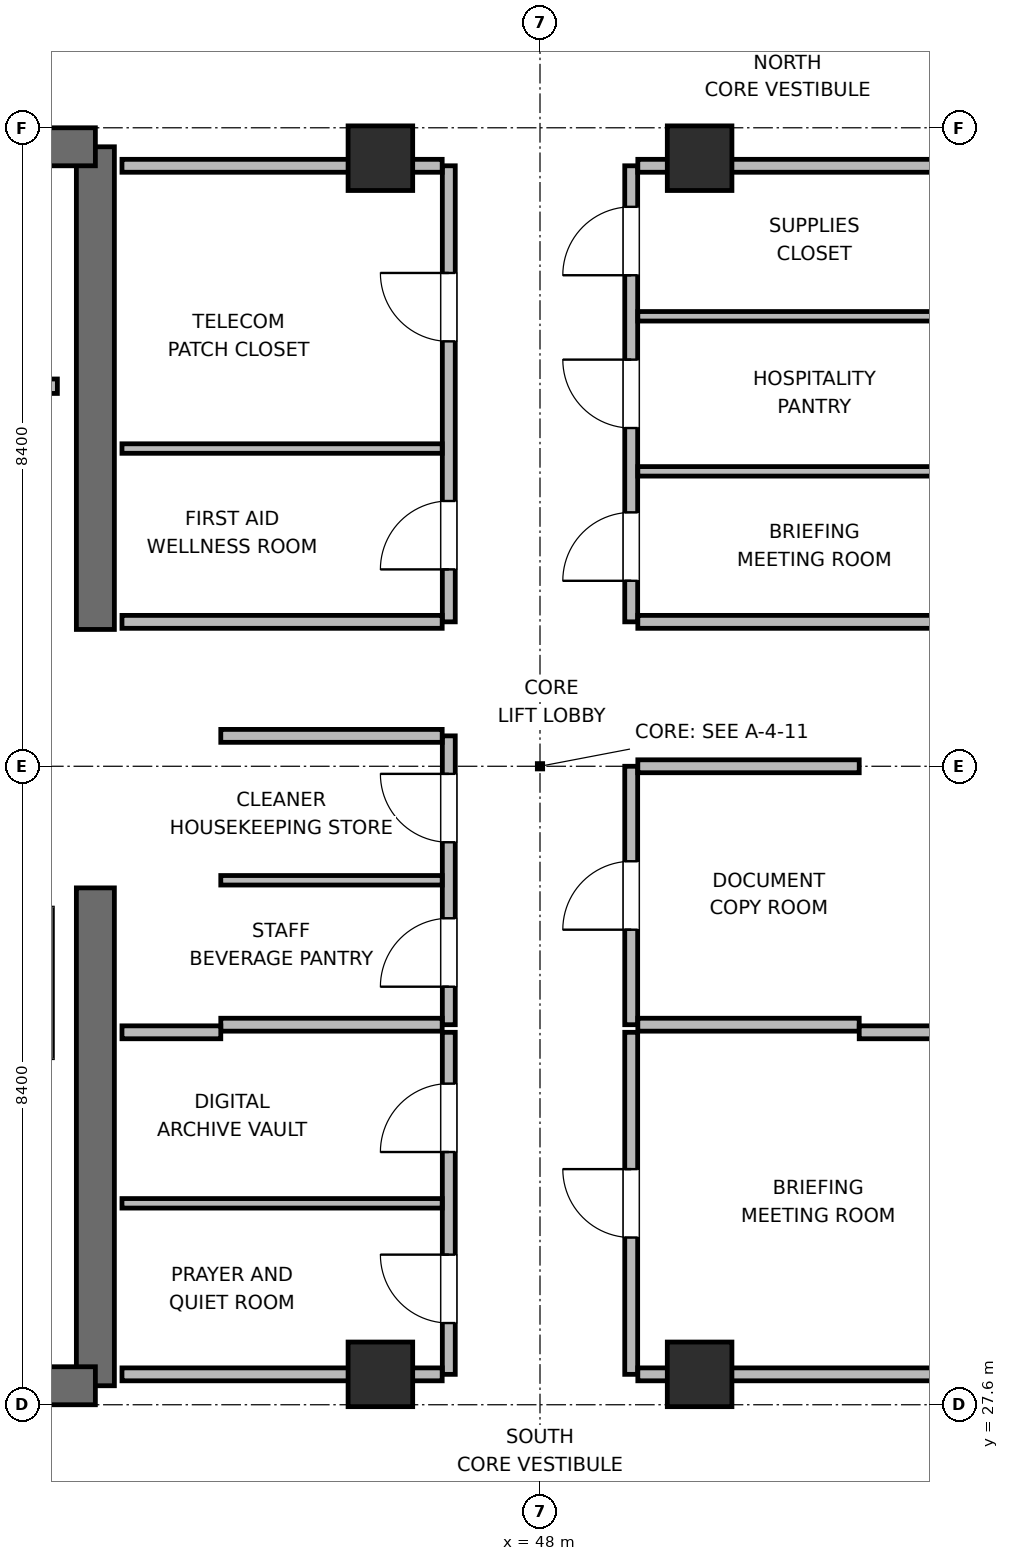
"""IFC4 building model, lengths in metres.
Left out: names, types, materials, properties, quantities, classifications, styles, units other than length and angle.
Written with IfcOpenShell. Run it as: python <this file> out.ifc"""

import sys

from ifc_helpers import new_model, si_unit, direction, frame, frame_2d, origin, origin_2d, place, context, subcontext, project, spatial, rectangle, extrude, element, fill, save


model = new_model("IFC4")
c1 = context("Model", 3, precision=1e-05, world=origin(), true_north=direction((0.0, 1.0)))
c2 = subcontext(c1, "Body", "Model", "MODEL_VIEW")
j1 = project(units=[si_unit("LENGTHUNIT", "METRE"), si_unit("PLANEANGLEUNIT", "RADIAN")], contexts=[c1])
p1 = place(None, origin())
s1 = spatial("IfcSite", under=j1, at=p1, CompositionType="ELEMENT")
p2 = place(p1, origin())
s2 = spatial("IfcBuilding", under=s1, at=p2, CompositionType="ELEMENT")
p3 = place(p2, frame((0.0, 0.0, 342.0)))
s3 = spatial("IfcBuildingStorey", under=s2, at=p3, CompositionType="ELEMENT", Elevation=342.0)
p4 = place(p3, frame((42.15, 27.85, 0.0), z_axis=(0.0, 0.0, 1.0), x_axis=(0.0, 1.0, 0.0)))
e1 = element("IfcWall", 1, at=p4, inside=s3, PredefinedType="SHEAR", context=c2, shape_type="SweptSolid", body=[
    extrude(rectangle(XDim=6.55, YDim=0.5, at=frame_2d((3.275, 0.0))), origin(), (0.0, 0.0, 1.0), 4.5),
])
p5 = place(p3, frame((42.15, 37.8, 0.0), z_axis=(0.0, 0.0, 1.0), x_axis=(0.0, 1.0, 0.0)))
e2 = element("IfcWall", 2, at=p5, inside=s3, PredefinedType="SHEAR", context=c2, shape_type="SweptSolid", body=[
    extrude(rectangle(XDim=6.35, YDim=0.5, at=frame_2d((3.175, 0.0))), origin(), (0.0, 0.0, 1.0), 4.5),
])
p6 = place(p3, frame((32.65, 27.85, 0.0), z_axis=(0.0, 0.0, 1.0), x_axis=(1.0, 0.0, 0.0)))
e3 = element("IfcWall", 3, at=p6, inside=s3, PredefinedType="SHEAR", context=c2, shape_type="SweptSolid", body=[
    extrude(rectangle(XDim=9.5, YDim=0.5, at=frame_2d((4.75, 0.0))), origin(), (0.0, 0.0, 1.0), 4.5),
])
p7 = place(p6, frame((5.075, 0.0, 0.0)))
e4 = element("IfcOpeningElement", 4, at=p7, cuts=e3, PredefinedType="OPENING", context=c2, shape_type="SweptSolid", body=[
    extrude(rectangle(XDim=1.05, YDim=2.04, at=frame_2d((0.525, 1.02))), frame((0.0, 0.26, 0.0), z_axis=(0.0, -1.0, 0.0), x_axis=(1.0, 0.0, 0.0)), (0.0, 0.0, 1.0), 0.52),
])
p8 = place(p3, frame((32.65, 44.15, 0.0), z_axis=(0.0, 0.0, 1.0), x_axis=(1.0, 0.0, 0.0)))
e5 = element("IfcWall", 5, at=p8, inside=s3, PredefinedType="SHEAR", context=c2, shape_type="SweptSolid", body=[
    extrude(rectangle(XDim=9.5, YDim=0.5, at=frame_2d((4.75, 0.0))), origin(), (0.0, 0.0, 1.0), 4.5),
])
p9 = place(p8, frame((1.075, 0.0, 0.0)))
e6 = element("IfcOpeningElement", 6, at=p9, cuts=e5, PredefinedType="OPENING", context=c2, shape_type="SweptSolid", body=[
    extrude(rectangle(XDim=0.95, YDim=2.04, at=frame_2d((0.475, 1.02))), frame((0.0, 0.26, 0.0), z_axis=(0.0, -1.0, 0.0), x_axis=(1.0, 0.0, 0.0)), (0.0, 0.0, 1.0), 0.52),
])
p10 = place(p8, frame((4.325, 0.0, 0.0)))
e7 = element("IfcOpeningElement", 7, at=p10, cuts=e5, PredefinedType="OPENING", context=c2, shape_type="SweptSolid", body=[
    extrude(rectangle(XDim=0.9, YDim=2.02, at=frame_2d((0.45, 1.01))), frame((0.0, 0.26, 0.0), z_axis=(0.0, -1.0, 0.0), x_axis=(1.0, 0.0, 0.0)), (0.0, 0.0, 1.0), 0.52),
])
p11 = place(p8, frame((7.225, 0.0, 0.0)))
e8 = element("IfcOpeningElement", 8, at=p11, cuts=e5, PredefinedType="OPENING", context=c2, shape_type="SweptSolid", body=[
    extrude(rectangle(XDim=0.9, YDim=2.02, at=frame_2d((0.45, 1.01))), frame((0.0, 0.26, 0.0), z_axis=(0.0, -1.0, 0.0), x_axis=(1.0, 0.0, 0.0)), (0.0, 0.0, 1.0), 0.52),
])
for number, where, z_axis, x_axis in (
    (9, (45.9, 28.0, 0.0), (0.0, 0.0, 1.0), (1.0, 0.0, 0.0)),
    (10, (50.1, 28.0, 0.0), (0.0, 0.0, 1.0), (1.0, 0.0, 0.0)),
    (11, (45.9, 44.0, 0.0), (0.0, 0.0, 1.0), (1.0, 0.0, 0.0)),
    (12, (50.1, 44.0, 0.0), (0.0, 0.0, 1.0), (1.0, 0.0, 0.0)),
):
    element("IfcColumn", number, at=place(p3, frame(where, z_axis=z_axis, x_axis=x_axis)), inside=s3, PredefinedType="COLUMN", context=c2, shape_type="SweptSolid", body=[
        extrude(rectangle(XDim=0.85, YDim=0.85, at=origin_2d()), origin(), (0.0, 0.0, 1.0), 4.5),
    ])
p12 = place(p3, frame((33.15, 41.0, 0.0), z_axis=(0.0, 0.0, 1.0), x_axis=(1.0, 0.0, 0.0)))
e13 = element("IfcWall", 13, at=p12, inside=s3, PredefinedType="PLUMBINGWALL", context=c2, shape_type="SweptSolid", body=[
    extrude(rectangle(XDim=8.5, YDim=0.19, at=frame_2d((4.25, 0.0))), origin(), (0.0, 0.0, 1.0), 4.28),
])
p13 = place(p3, frame((46.8, 32.6, 0.0), z_axis=(0.0, 0.0, 1.0), x_axis=(0.0, 1.0, 0.0)))
e14 = element("IfcWall", 14, at=p13, inside=s3, PredefinedType="PARTITIONING", context=c2, shape_type="SweptSolid", body=[
    extrude(rectangle(XDim=3.8, YDim=0.17, at=frame_2d((1.9, 0.0))), origin(), (0.0, 0.0, 1.0), 4.28),
])
p14 = place(p13, frame((0.5, 0.0, 0.0)))
e15 = element("IfcOpeningElement", 15, at=p14, cuts=e14, PredefinedType="OPENING", context=c2, shape_type="SweptSolid", body=[
    extrude(rectangle(XDim=0.9, YDim=2.02, at=frame_2d((0.45, 1.01))), frame((0.0, 0.095, 0.0), z_axis=(0.0, -1.0, 0.0), x_axis=(1.0, 0.0, 0.0)), (0.0, 0.0, 1.0), 0.19),
])
p15 = place(p13, frame((2.4, 0.0, 0.0)))
e16 = element("IfcOpeningElement", 16, at=p15, cuts=e14, PredefinedType="OPENING", context=c2, shape_type="SweptSolid", body=[
    extrude(rectangle(XDim=0.9, YDim=2.02, at=frame_2d((0.45, 1.01))), frame((0.0, 0.095, 0.0), z_axis=(0.0, -1.0, 0.0), x_axis=(1.0, 0.0, 0.0)), (0.0, 0.0, 1.0), 0.19),
])
for number, where, z_axis, x_axis in (
    (17, (43.8, 32.6, 0.0), (0.0, 0.0, 1.0), (1.0, 0.0, 0.0)),
    (18, (43.8, 36.4, 0.0), (0.0, 0.0, 1.0), (1.0, 0.0, 0.0)),
):
    element("IfcWall", number, at=place(p3, frame(where, z_axis=z_axis, x_axis=x_axis)), inside=s3, PredefinedType="PARTITIONING", context=c2, shape_type="SweptSolid", body=[
        extrude(rectangle(XDim=2.913, YDim=0.17, at=frame_2d((1.457, 0.0))), origin(), (0.0, 0.0, 1.0), 4.28),
    ])
p16 = place(p3, frame((43.8, 34.5, 0.0), z_axis=(0.0, 0.0, 1.0), x_axis=(1.0, 0.0, 0.0)))
e19 = element("IfcWall", 19, at=p16, inside=s3, PredefinedType="PARTITIONING", context=c2, shape_type="SweptSolid", body=[
    extrude(rectangle(XDim=2.913, YDim=0.125, at=frame_2d((1.457, 0.0))), origin(), (0.0, 0.0, 1.0), 4.28),
])
p17 = place(p3, frame((49.2, 32.6, 0.0), z_axis=(0.0, 0.0, 1.0), x_axis=(0.0, 1.0, 0.0)))
e20 = element("IfcWall", 20, at=p17, inside=s3, PredefinedType="PARTITIONING", context=c2, shape_type="SweptSolid", body=[
    extrude(rectangle(XDim=3.4, YDim=0.17, at=frame_2d((1.7, 0.0))), origin(), (0.0, 0.0, 1.0), 4.28),
])
p18 = place(p17, frame((1.25, 0.0, 0.0)))
e21 = element("IfcOpeningElement", 21, at=p18, cuts=e20, PredefinedType="OPENING", context=c2, shape_type="SweptSolid", body=[
    extrude(rectangle(XDim=0.9, YDim=2.02, at=frame_2d((0.45, 1.01))), frame((0.0, 0.095, 0.0), z_axis=(0.0, -1.0, 0.0), x_axis=(1.0, 0.0, 0.0)), (0.0, 0.0, 1.0), 0.19),
])
for number, where, z_axis, x_axis in (
    (22, (49.287, 32.6, 0.0), (0.0, 0.0, 1.0), (1.0, 0.0, 0.0)),
    (23, (49.287, 36.0, 0.0), (0.0, 0.0, 1.0), (1.0, 0.0, 0.0)),
):
    element("IfcWall", number, at=place(p3, frame(where, z_axis=z_axis, x_axis=x_axis)), inside=s3, PredefinedType="PARTITIONING", context=c2, shape_type="SweptSolid", body=[
        extrude(rectangle(XDim=2.913, YDim=0.17, at=frame_2d((1.457, 0.0))), origin(), (0.0, 0.0, 1.0), 4.28),
    ])
p19 = place(p3, frame((46.8, 28.0, 0.0), z_axis=(0.0, 0.0, 1.0), x_axis=(0.0, 1.0, 0.0)))
e24 = element("IfcWall", 24, at=p19, inside=s3, PredefinedType="PARTITIONING", context=c2, shape_type="SweptSolid", body=[
    extrude(rectangle(XDim=4.5, YDim=0.17, at=frame_2d((2.25, 0.0))), origin(), (0.0, 0.0, 1.0), 4.28),
])
p20 = place(p19, frame((0.675, 0.0, 0.0)))
e25 = element("IfcOpeningElement", 25, at=p20, cuts=e24, PredefinedType="OPENING", context=c2, shape_type="SweptSolid", body=[
    extrude(rectangle(XDim=0.9, YDim=2.02, at=frame_2d((0.45, 1.01))), frame((0.0, 0.095, 0.0), z_axis=(0.0, -1.0, 0.0), x_axis=(1.0, 0.0, 0.0)), (0.0, 0.0, 1.0), 0.19),
])
p21 = place(p19, frame((2.925, 0.0, 0.0)))
e26 = element("IfcOpeningElement", 26, at=p21, cuts=e24, PredefinedType="OPENING", context=c2, shape_type="SweptSolid", body=[
    extrude(rectangle(XDim=0.9, YDim=2.02, at=frame_2d((0.45, 1.01))), frame((0.0, 0.095, 0.0), z_axis=(0.0, -1.0, 0.0), x_axis=(1.0, 0.0, 0.0)), (0.0, 0.0, 1.0), 0.19),
])
p22 = place(p3, frame((42.5, 28.0, 0.0), z_axis=(0.0, 0.0, 1.0), x_axis=(1.0, 0.0, 0.0)))
e27 = element("IfcWall", 27, at=p22, inside=s3, PredefinedType="PARTITIONING", context=c2, shape_type="SweptSolid", body=[
    extrude(rectangle(XDim=4.213, YDim=0.17, at=frame_2d((2.106, 0.0))), origin(), (0.0, 0.0, 1.0), 3.365),
])
p23 = place(p3, frame((42.5, 32.5, 0.0), z_axis=(0.0, 0.0, 1.0), x_axis=(1.0, 0.0, 0.0)))
e28 = element("IfcWall", 28, at=p23, inside=s3, PredefinedType="PARTITIONING", context=c2, shape_type="SweptSolid", body=[
    extrude(rectangle(XDim=1.3, YDim=0.17, at=frame_2d((0.65, 0.0))), origin(), (0.0, 0.0, 1.0), 4.28),
])
p24 = place(p3, frame((42.5, 30.25, 0.0), z_axis=(0.0, 0.0, 1.0), x_axis=(1.0, 0.0, 0.0)))
e29 = element("IfcWall", 29, at=p24, inside=s3, PredefinedType="PARTITIONING", context=c2, shape_type="SweptSolid", body=[
    extrude(rectangle(XDim=4.213, YDim=0.125, at=frame_2d((2.106, 0.0))), origin(), (0.0, 0.0, 1.0), 4.28),
])
p25 = place(p3, frame((49.2, 28.0, 0.0), z_axis=(0.0, 0.0, 1.0), x_axis=(0.0, 1.0, 0.0)))
e30 = element("IfcWall", 30, at=p25, inside=s3, PredefinedType="PARTITIONING", context=c2, shape_type="SweptSolid", body=[
    extrude(rectangle(XDim=4.5, YDim=0.17, at=frame_2d((2.25, 0.0))), origin(), (0.0, 0.0, 1.0), 4.28),
])
p26 = place(p25, frame((1.8, 0.0, 0.0)))
e31 = element("IfcOpeningElement", 31, at=p26, cuts=e30, PredefinedType="OPENING", context=c2, shape_type="SweptSolid", body=[
    extrude(rectangle(XDim=0.9, YDim=2.02, at=frame_2d((0.45, 1.01))), frame((0.0, 0.095, 0.0), z_axis=(0.0, -1.0, 0.0), x_axis=(1.0, 0.0, 0.0)), (0.0, 0.0, 1.0), 0.19),
])
p27 = place(p3, frame((49.287, 28.0, 0.0), z_axis=(0.0, 0.0, 1.0), x_axis=(1.0, 0.0, 0.0)))
e32 = element("IfcWall", 32, at=p27, inside=s3, PredefinedType="PARTITIONING", context=c2, shape_type="SweptSolid", body=[
    extrude(rectangle(XDim=4.213, YDim=0.17, at=frame_2d((2.106, 0.0))), origin(), (0.0, 0.0, 1.0), 3.365),
])
p28 = place(p3, frame((52.2, 32.5, 0.0), z_axis=(0.0, 0.0, 1.0), x_axis=(1.0, 0.0, 0.0)))
e33 = element("IfcWall", 33, at=p28, inside=s3, PredefinedType="PARTITIONING", context=c2, shape_type="SweptSolid", body=[
    extrude(rectangle(XDim=1.3, YDim=0.17, at=frame_2d((0.65, 0.0))), origin(), (0.0, 0.0, 1.0), 4.28),
])
p29 = place(p3, frame((46.8, 37.9, 0.0), z_axis=(0.0, 0.0, 1.0), x_axis=(0.0, 1.0, 0.0)))
e34 = element("IfcWall", 34, at=p29, inside=s3, PredefinedType="PARTITIONING", context=c2, shape_type="SweptSolid", body=[
    extrude(rectangle(XDim=6.0, YDim=0.17, at=frame_2d((3.0, 0.0))), origin(), (0.0, 0.0, 1.0), 4.28),
])
p30 = place(p29, frame((0.69, 0.0, 0.0)))
e35 = element("IfcOpeningElement", 35, at=p30, cuts=e34, PredefinedType="OPENING", context=c2, shape_type="SweptSolid", body=[
    extrude(rectangle(XDim=0.9, YDim=2.02, at=frame_2d((0.45, 1.01))), frame((0.0, 0.095, 0.0), z_axis=(0.0, -1.0, 0.0), x_axis=(1.0, 0.0, 0.0)), (0.0, 0.0, 1.0), 0.19),
])
p31 = place(p29, frame((3.69, 0.0, 0.0)))
e36 = element("IfcOpeningElement", 36, at=p31, cuts=e34, PredefinedType="OPENING", context=c2, shape_type="SweptSolid", body=[
    extrude(rectangle(XDim=0.9, YDim=2.02, at=frame_2d((0.45, 1.01))), frame((0.0, 0.095, 0.0), z_axis=(0.0, -1.0, 0.0), x_axis=(1.0, 0.0, 0.0)), (0.0, 0.0, 1.0), 0.19),
])
p32 = place(p3, frame((42.5, 37.9, 0.0), z_axis=(0.0, 0.0, 1.0), x_axis=(1.0, 0.0, 0.0)))
e37 = element("IfcWall", 37, at=p32, inside=s3, PredefinedType="PARTITIONING", context=c2, shape_type="SweptSolid", body=[
    extrude(rectangle(XDim=4.213, YDim=0.17, at=frame_2d((2.106, 0.0))), origin(), (0.0, 0.0, 1.0), 4.28),
])
p33 = place(p3, frame((42.5, 43.9, 0.0), z_axis=(0.0, 0.0, 1.0), x_axis=(1.0, 0.0, 0.0)))
e38 = element("IfcWall", 38, at=p33, inside=s3, PredefinedType="PARTITIONING", context=c2, shape_type="SweptSolid", body=[
    extrude(rectangle(XDim=4.213, YDim=0.17, at=frame_2d((2.106, 0.0))), origin(), (0.0, 0.0, 1.0), 3.365),
])
p34 = place(p3, frame((42.5, 40.18, 0.0), z_axis=(0.0, 0.0, 1.0), x_axis=(1.0, 0.0, 0.0)))
e39 = element("IfcWall", 39, at=p34, inside=s3, PredefinedType="PARTITIONING", context=c2, shape_type="SweptSolid", body=[
    extrude(rectangle(XDim=4.213, YDim=0.125, at=frame_2d((2.106, 0.0))), origin(), (0.0, 0.0, 1.0), 4.28),
])
p35 = place(p3, frame((49.2, 37.9, 0.0), z_axis=(0.0, 0.0, 1.0), x_axis=(0.0, 1.0, 0.0)))
e40 = element("IfcWall", 40, at=p35, inside=s3, PredefinedType="PARTITIONING", context=c2, shape_type="SweptSolid", body=[
    extrude(rectangle(XDim=6.0, YDim=0.17, at=frame_2d((3.0, 0.0))), origin(), (0.0, 0.0, 1.0), 4.28),
])
p36 = place(p35, frame((0.54, 0.0, 0.0)))
e41 = element("IfcOpeningElement", 41, at=p36, cuts=e40, PredefinedType="OPENING", context=c2, shape_type="SweptSolid", body=[
    extrude(rectangle(XDim=0.9, YDim=2.02, at=frame_2d((0.45, 1.01))), frame((0.0, 0.095, 0.0), z_axis=(0.0, -1.0, 0.0), x_axis=(1.0, 0.0, 0.0)), (0.0, 0.0, 1.0), 0.19),
])
p37 = place(p35, frame((2.55, 0.0, 0.0)))
e42 = element("IfcOpeningElement", 42, at=p37, cuts=e40, PredefinedType="OPENING", context=c2, shape_type="SweptSolid", body=[
    extrude(rectangle(XDim=0.9, YDim=2.02, at=frame_2d((0.45, 1.01))), frame((0.0, 0.095, 0.0), z_axis=(0.0, -1.0, 0.0), x_axis=(1.0, 0.0, 0.0)), (0.0, 0.0, 1.0), 0.19),
])
p38 = place(p35, frame((4.56, 0.0, 0.0)))
e43 = element("IfcOpeningElement", 43, at=p38, cuts=e40, PredefinedType="OPENING", context=c2, shape_type="SweptSolid", body=[
    extrude(rectangle(XDim=0.9, YDim=2.02, at=frame_2d((0.45, 1.01))), frame((0.0, 0.095, 0.0), z_axis=(0.0, -1.0, 0.0), x_axis=(1.0, 0.0, 0.0)), (0.0, 0.0, 1.0), 0.19),
])
p39 = place(p3, frame((49.287, 37.9, 0.0), z_axis=(0.0, 0.0, 1.0), x_axis=(1.0, 0.0, 0.0)))
e44 = element("IfcWall", 44, at=p39, inside=s3, PredefinedType="PARTITIONING", context=c2, shape_type="SweptSolid", body=[
    extrude(rectangle(XDim=4.113, YDim=0.17, at=frame_2d((2.056, 0.0))), origin(), (0.0, 0.0, 1.0), 4.28),
])
p40 = place(p3, frame((49.287, 43.9, 0.0), z_axis=(0.0, 0.0, 1.0), x_axis=(1.0, 0.0, 0.0)))
e45 = element("IfcWall", 45, at=p40, inside=s3, PredefinedType="PARTITIONING", context=c2, shape_type="SweptSolid", body=[
    extrude(rectangle(XDim=4.113, YDim=0.17, at=frame_2d((2.056, 0.0))), origin(), (0.0, 0.0, 1.0), 3.365),
])
for number, where, z_axis, x_axis in (
    (46, (49.287, 39.88, 0.0), (0.0, 0.0, 1.0), (1.0, 0.0, 0.0)),
    (47, (49.287, 41.92, 0.0), (0.0, 0.0, 1.0), (1.0, 0.0, 0.0)),
):
    element("IfcWall", number, at=place(p3, frame(where, z_axis=z_axis, x_axis=x_axis)), inside=s3, PredefinedType="PARTITIONING", context=c2, shape_type="SweptSolid", body=[
        extrude(rectangle(XDim=4.113, YDim=0.125, at=frame_2d((2.056, 0.0))), origin(), (0.0, 0.0, 1.0), 4.28),
    ])
p41 = place(p14, origin())
e48 = element("IfcDoor", 48, at=p41, inside=s3, OperationType="SINGLE_SWING_LEFT", PredefinedType="DOOR", context=c2, shape_type="SweptSolid", body=[
    extrude(rectangle(XDim=0.9, YDim=2.02, at=frame_2d((0.45, 1.01))), frame((0.0, 0.025, 0.0), z_axis=(0.0, -1.0, 0.0), x_axis=(1.0, 0.0, 0.0)), (0.0, 0.0, 1.0), 0.05),
])
fill(e15, e48)
p42 = place(p15, origin())
e49 = element("IfcDoor", 49, at=p42, inside=s3, OperationType="SINGLE_SWING_RIGHT", PredefinedType="DOOR", context=c2, shape_type="SweptSolid", body=[
    extrude(rectangle(XDim=0.9, YDim=2.02, at=frame_2d((0.45, 1.01))), frame((0.0, 0.025, 0.0), z_axis=(0.0, -1.0, 0.0), x_axis=(1.0, 0.0, 0.0)), (0.0, 0.0, 1.0), 0.05),
])
fill(e16, e49)
p43 = place(p18, origin())
e50 = element("IfcDoor", 50, at=p43, inside=s3, OperationType="SINGLE_SWING_LEFT", PredefinedType="DOOR", context=c2, shape_type="SweptSolid", body=[
    extrude(rectangle(XDim=0.9, YDim=2.02, at=frame_2d((0.45, 1.01))), frame((0.0, 0.025, 0.0), z_axis=(0.0, -1.0, 0.0), x_axis=(1.0, 0.0, 0.0)), (0.0, 0.0, 1.0), 0.05),
])
fill(e21, e50)
p44 = place(p20, origin())
e51 = element("IfcDoor", 51, at=p44, inside=s3, OperationType="SINGLE_SWING_RIGHT", PredefinedType="DOOR", context=c2, shape_type="SweptSolid", body=[
    extrude(rectangle(XDim=0.9, YDim=2.02, at=frame_2d((0.45, 1.01))), frame((0.0, 0.025, 0.0), z_axis=(0.0, -1.0, 0.0), x_axis=(1.0, 0.0, 0.0)), (0.0, 0.0, 1.0), 0.05),
])
fill(e25, e51)
p45 = place(p21, origin())
e52 = element("IfcDoor", 52, at=p45, inside=s3, OperationType="SINGLE_SWING_LEFT", PredefinedType="DOOR", context=c2, shape_type="SweptSolid", body=[
    extrude(rectangle(XDim=0.9, YDim=2.02, at=frame_2d((0.45, 1.01))), frame((0.0, 0.025, 0.0), z_axis=(0.0, -1.0, 0.0), x_axis=(1.0, 0.0, 0.0)), (0.0, 0.0, 1.0), 0.05),
])
fill(e26, e52)
p46 = place(p26, origin())
e53 = element("IfcDoor", 53, at=p46, inside=s3, OperationType="SINGLE_SWING_RIGHT", PredefinedType="DOOR", context=c2, shape_type="SweptSolid", body=[
    extrude(rectangle(XDim=0.9, YDim=2.02, at=frame_2d((0.45, 1.01))), frame((0.0, 0.025, 0.0), z_axis=(0.0, -1.0, 0.0), x_axis=(1.0, 0.0, 0.0)), (0.0, 0.0, 1.0), 0.05),
])
fill(e31, e53)
p47 = place(p30, origin())
e54 = element("IfcDoor", 54, at=p47, inside=s3, OperationType="SINGLE_SWING_LEFT", PredefinedType="DOOR", context=c2, shape_type="SweptSolid", body=[
    extrude(rectangle(XDim=0.9, YDim=2.02, at=frame_2d((0.45, 1.01))), frame((0.0, 0.025, 0.0), z_axis=(0.0, -1.0, 0.0), x_axis=(1.0, 0.0, 0.0)), (0.0, 0.0, 1.0), 0.05),
])
fill(e35, e54)
p48 = place(p31, origin())
e55 = element("IfcDoor", 55, at=p48, inside=s3, OperationType="SINGLE_SWING_RIGHT", PredefinedType="DOOR", context=c2, shape_type="SweptSolid", body=[
    extrude(rectangle(XDim=0.9, YDim=2.02, at=frame_2d((0.45, 1.01))), frame((0.0, 0.025, 0.0), z_axis=(0.0, -1.0, 0.0), x_axis=(1.0, 0.0, 0.0)), (0.0, 0.0, 1.0), 0.05),
])
fill(e36, e55)
p49 = place(p36, origin())
e56 = element("IfcDoor", 56, at=p49, inside=s3, OperationType="SINGLE_SWING_LEFT", PredefinedType="DOOR", context=c2, shape_type="SweptSolid", body=[
    extrude(rectangle(XDim=0.9, YDim=2.02, at=frame_2d((0.45, 1.01))), frame((0.0, 0.025, 0.0), z_axis=(0.0, -1.0, 0.0), x_axis=(1.0, 0.0, 0.0)), (0.0, 0.0, 1.0), 0.05),
])
fill(e41, e56)
p50 = place(p37, origin())
e57 = element("IfcDoor", 57, at=p50, inside=s3, OperationType="SINGLE_SWING_RIGHT", PredefinedType="DOOR", context=c2, shape_type="SweptSolid", body=[
    extrude(rectangle(XDim=0.9, YDim=2.02, at=frame_2d((0.45, 1.01))), frame((0.0, 0.025, 0.0), z_axis=(0.0, -1.0, 0.0), x_axis=(1.0, 0.0, 0.0)), (0.0, 0.0, 1.0), 0.05),
])
fill(e42, e57)
p51 = place(p38, origin())
e58 = element("IfcDoor", 58, at=p51, inside=s3, OperationType="SINGLE_SWING_LEFT", PredefinedType="DOOR", context=c2, shape_type="SweptSolid", body=[
    extrude(rectangle(XDim=0.9, YDim=2.02, at=frame_2d((0.45, 1.01))), frame((0.0, 0.025, 0.0), z_axis=(0.0, -1.0, 0.0), x_axis=(1.0, 0.0, 0.0)), (0.0, 0.0, 1.0), 0.05),
])
fill(e43, e58)
save(model, sys.argv[1])
